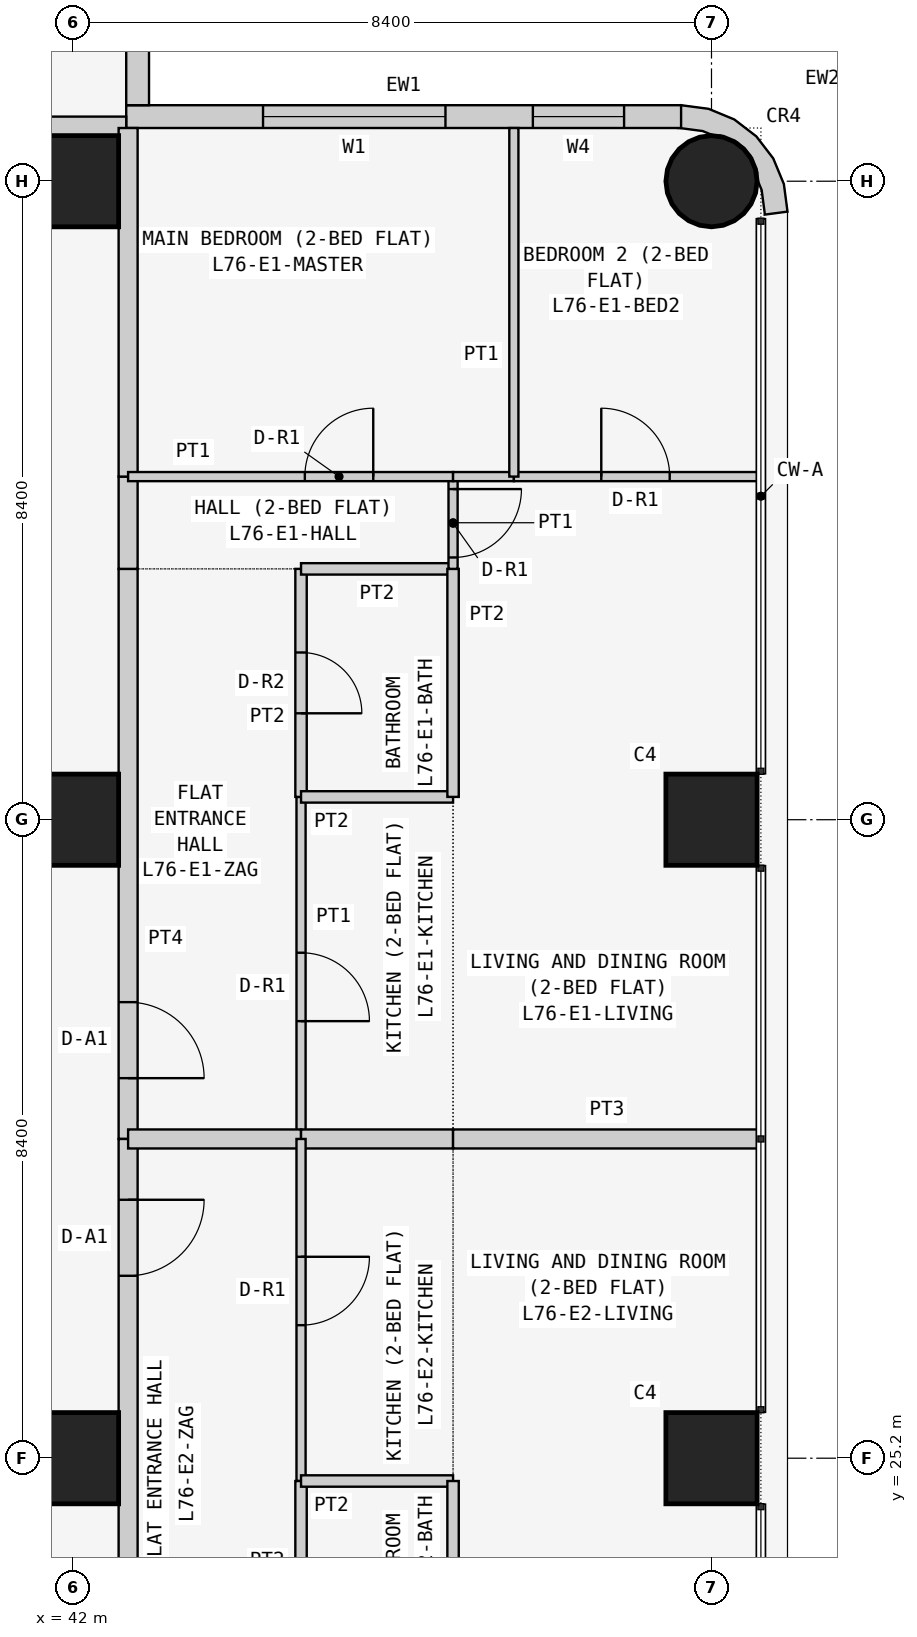
"""IFC4 building model, lengths in metres.
Left out: names, types, materials, properties, quantities, classifications, styles, units other than length and angle.
Written with IfcOpenShell. Run it as: python <this file> out.ifc"""

import sys

from ifc_helpers import new_model, si_unit, direction, frame, frame_2d, origin, origin_2d, place, context, subcontext, project, spatial, polyline, rectangle, circle, outline, extrude, element, fill, save


model = new_model("IFC4")
c1 = context("Model", 3, precision=1e-05, world=origin(), true_north=direction((0.0, 1.0)))
c2 = subcontext(c1, "Body", "Model", "MODEL_VIEW")
j1 = project(units=[si_unit("LENGTHUNIT", "METRE"), si_unit("PLANEANGLEUNIT", "RADIAN")], contexts=[c1])
p1 = place(None, origin())
s1 = spatial("IfcSite", under=j1, at=p1, CompositionType="ELEMENT")
p2 = place(p1, origin())
s2 = spatial("IfcBuilding", under=s1, at=p2, CompositionType="ELEMENT")
p3 = place(p2, frame((0.0, 0.0, 290.1)))
s3 = spatial("IfcBuildingStorey", under=s2, at=p3, CompositionType="ELEMENT", Elevation=290.1)
for number, where, z_axis, x_axis in (
    (1, (42.0, 25.2, 0.0), (0.0, 0.0, 1.0), (1.0, 0.0, 0.0)),
    (2, (42.0, 33.6, 0.0), (0.0, 0.0, 1.0), (1.0, 0.0, 0.0)),
    (3, (42.0, 42.0, 0.0), (0.0, 0.0, 1.0), (1.0, 0.0, 0.0)),
    (4, (50.4, 25.2, 0.0), (0.0, 0.0, 1.0), (1.0, 0.0, 0.0)),
    (5, (50.4, 33.6, 0.0), (0.0, 0.0, 1.0), (1.0, 0.0, 0.0)),
):
    element("IfcColumn", number, at=place(p3, frame(where, z_axis=z_axis, x_axis=x_axis)), inside=s3, PredefinedType="COLUMN", context=c2, shape_type="SweptSolid", body=[
        extrude(rectangle(XDim=1.2, YDim=1.2, at=origin_2d()), origin(), (0.0, 0.0, 1.0), 3.6),
    ])
p4 = place(p3, frame((50.4, 42.0, 0.0), z_axis=(0.0, 0.0, 1.0), x_axis=(1.0, 0.0, 0.0)))
e6 = element("IfcColumn", 6, at=p4, inside=s3, PredefinedType="COLUMN", context=c2, shape_type="SweptSolid", body=[
    extrude(circle(Radius=0.6, at=origin_2d()), origin(), (0.0, 0.0, 1.0), 3.6),
])
p5 = place(p3, frame((50.0, 42.85, 0.0), z_axis=(0.0, 0.0, 1.0), x_axis=(-1.0, 0.0, 0.0)))
e7 = element("IfcWall", 7, at=p5, inside=s3, PredefinedType="SOLIDWALL", context=c2, shape_type="SweptSolid", body=[
    extrude(rectangle(XDim=7.3, YDim=0.3, at=frame_2d((3.65, 0.0))), origin(), (0.0, 0.0, 1.0), 3.45),
])
p6 = place(p5, frame((3.1, 0.0, 0.9)))
e8 = element("IfcOpeningElement", 8, at=p6, cuts=e7, PredefinedType="OPENING", context=c2, shape_type="SweptSolid", body=[
    extrude(rectangle(XDim=2.4, YDim=1.5, at=frame_2d((1.2, 0.75))), frame((0.0, 0.16, 0.0), z_axis=(0.0, -1.0, 0.0), x_axis=(1.0, 0.0, 0.0)), (0.0, 0.0, 1.0), 0.32),
])
p7 = place(p5, frame((0.75, 0.0, 0.9)))
e9 = element("IfcOpeningElement", 9, at=p7, cuts=e7, PredefinedType="OPENING", context=c2, shape_type="SweptSolid", body=[
    extrude(rectangle(XDim=1.2, YDim=1.5, at=frame_2d((0.6, 0.75))), frame((0.0, 0.16, 0.0), z_axis=(0.0, -1.0, 0.0), x_axis=(1.0, 0.0, 0.0)), (0.0, 0.0, 1.0), 0.32),
])
p8 = place(p3, frame((42.85, 43.0, 0.0), z_axis=(0.0, 0.0, 1.0), x_axis=(0.0, 1.0, 0.0)))
e10 = element("IfcWall", 10, at=p8, inside=s3, PredefinedType="SOLIDWALL", context=c2, shape_type="SweptSolid", body=[
    extrude(rectangle(XDim=7.0, YDim=0.3, at=frame_2d((3.5, 0.0))), origin(), (0.0, 0.0, 1.0), 3.45),
])
p9 = place(p8, frame((1.5, 0.0, 0.9)))
e11 = element("IfcOpeningElement", 11, at=p9, cuts=e10, PredefinedType="OPENING", context=c2, shape_type="SweptSolid", body=[
    extrude(rectangle(XDim=2.4, YDim=1.5, at=frame_2d((1.2, 0.75))), frame((0.0, 0.16, 0.0), z_axis=(0.0, -1.0, 0.0), x_axis=(1.0, 0.0, 0.0)), (0.0, 0.0, 1.0), 0.32),
])
p10 = place(p8, frame((5.05, 0.0, 0.9)))
e12 = element("IfcOpeningElement", 12, at=p10, cuts=e10, PredefinedType="OPENING", context=c2, shape_type="SweptSolid", body=[
    extrude(rectangle(XDim=1.2, YDim=1.5, at=frame_2d((0.6, 0.75))), frame((0.0, 0.16, 0.0), z_axis=(0.0, -1.0, 0.0), x_axis=(1.0, 0.0, 0.0)), (0.0, 0.0, 1.0), 0.32),
])
p11 = place(p3, frame((50.976, 41.638, 0.0), z_axis=(0.0, 0.0, 1.0), x_axis=(0.707106781187, 0.707106781187, 0.0)))
e13 = element("IfcWall", 13, at=p11, inside=s3, PredefinedType="SOLIDWALL", context=c2, shape_type="SweptSolid", body=[
    extrude(outline(polyline([(0.233, 0.114), (0.047, -0.129), (0.033, -0.143), (0.273, -0.327), (0.495, -0.037), (0.635, 0.301), (0.683, 0.663), (0.635, 1.025), (0.495, 1.363), (0.273, 1.653), (0.033, 1.469), (0.047, 1.455), (0.233, 1.212), (0.292, 1.069), (0.358, 1.003), (0.449, 0.782), (0.449, 0.543), (0.358, 0.322), (0.292, 0.257), (0.233, 0.114)])), origin(), (0.0, 0.0, 1.0), 3.45),
])
p12 = place(p3, frame((35.829, 42.725, 0.0), z_axis=(0.0, 0.0, 1.0), x_axis=(1.0, 0.0, 0.0)))
e14 = element("IfcWall", 14, at=p12, inside=s3, PredefinedType="PARTITIONING", context=c2, shape_type="SweptSolid", body=[
    extrude(rectangle(XDim=6.871, YDim=0.25, at=frame_2d((3.436, 0.0))), origin(), (0.0, 0.0, 1.0), 3.45),
])
p13 = place(p3, frame((42.725, 36.9, 0.0), z_axis=(0.0, 0.0, 1.0), x_axis=(0.0, -1.0, 0.0)))
e15 = element("IfcWall", 15, at=p13, inside=s3, PredefinedType="PARTITIONING", context=c2, shape_type="SweptSolid", body=[
    extrude(rectangle(XDim=7.5, YDim=0.25, at=frame_2d((3.75, 0.0))), origin(), (0.0, 0.0, 1.0), 3.45),
])
p14 = place(p13, frame((5.7, 0.0, 0.0)))
e16 = element("IfcOpeningElement", 16, at=p14, cuts=e15, PredefinedType="OPENING", context=c2, shape_type="SweptSolid", body=[
    extrude(rectangle(XDim=1.0, YDim=2.1, at=frame_2d((0.5, 1.05))), frame((0.0, 0.135, 0.0), z_axis=(0.0, -1.0, 0.0), x_axis=(1.0, 0.0, 0.0)), (0.0, 0.0, 1.0), 0.27),
])
p15 = place(p3, frame((42.725, 38.114, 0.0), z_axis=(0.0, 0.0, 1.0), x_axis=(0.0, -1.0, 0.0)))
e17 = element("IfcWall", 17, at=p15, inside=s3, PredefinedType="PARTITIONING", context=c2, shape_type="SweptSolid", body=[
    extrude(rectangle(XDim=1.214, YDim=0.25, at=frame_2d((0.607, 0.0))), origin(), (0.0, 0.0, 1.0), 3.45),
])
p16 = place(p3, frame((42.725, 42.7, 0.0), z_axis=(0.0, 0.0, 1.0), x_axis=(0.0, -1.0, 0.0)))
e18 = element("IfcWall", 18, at=p16, inside=s3, PredefinedType="PARTITIONING", context=c2, shape_type="SweptSolid", body=[
    extrude(rectangle(XDim=4.586, YDim=0.25, at=frame_2d((2.293, 0.0))), origin(), (0.0, 0.0, 1.0), 3.45),
])
p17 = place(p3, frame((42.725, 29.4, 0.0), z_axis=(0.0, 0.0, 1.0), x_axis=(0.0, -1.0, 0.0)))
e19 = element("IfcWall", 19, at=p17, inside=s3, PredefinedType="PARTITIONING", context=c2, shape_type="SweptSolid", body=[
    extrude(rectangle(XDim=7.5, YDim=0.25, at=frame_2d((3.75, 0.0))), origin(), (0.0, 0.0, 1.0), 3.45),
])
p18 = place(p17, frame((0.8, 0.0, 0.0)))
e20 = element("IfcOpeningElement", 20, at=p18, cuts=e19, PredefinedType="OPENING", context=c2, shape_type="SweptSolid", body=[
    extrude(rectangle(XDim=1.0, YDim=2.1, at=frame_2d((0.5, 1.05))), frame((0.0, 0.135, 0.0), z_axis=(0.0, -1.0, 0.0), x_axis=(1.0, 0.0, 0.0)), (0.0, 0.0, 1.0), 0.27),
])
p19 = place(p3, frame((45.0, 29.4, 0.0), z_axis=(0.0, 0.0, 1.0), x_axis=(0.0, 1.0, 0.0)))
e21 = element("IfcWall", 21, at=p19, inside=s3, PredefinedType="PARTITIONING", context=c2, shape_type="SweptSolid", body=[
    extrude(rectangle(XDim=4.5, YDim=0.12, at=frame_2d((2.25, 0.0))), origin(), (0.0, 0.0, 1.0), 3.45),
])
p20 = place(p19, frame((1.55, 0.0, 0.0)))
e22 = element("IfcOpeningElement", 22, at=p20, cuts=e21, PredefinedType="OPENING", context=c2, shape_type="SweptSolid", body=[
    extrude(rectangle(XDim=0.9, YDim=2.1, at=frame_2d((0.45, 1.05))), frame((0.0, 0.07, 0.0), z_axis=(0.0, -1.0, 0.0), x_axis=(1.0, 0.0, 0.0)), (0.0, 0.0, 1.0), 0.14),
])
p21 = place(p3, frame((45.0, 33.9, 0.0), z_axis=(0.0, 0.0, 1.0), x_axis=(0.0, 1.0, 0.0)))
e23 = element("IfcWall", 23, at=p21, inside=s3, PredefinedType="PARTITIONING", context=c2, shape_type="SweptSolid", body=[
    extrude(rectangle(XDim=3.0, YDim=0.15, at=frame_2d((1.5, 0.0))), origin(), (0.0, 0.0, 1.0), 3.45),
])
p22 = place(p21, frame((1.1, 0.0, 0.0)))
e24 = element("IfcOpeningElement", 24, at=p22, cuts=e23, PredefinedType="OPENING", context=c2, shape_type="SweptSolid", body=[
    extrude(rectangle(XDim=0.8, YDim=2.1, at=frame_2d((0.4, 1.05))), frame((0.0, 0.085, 0.0), z_axis=(0.0, -1.0, 0.0), x_axis=(1.0, 0.0, 0.0)), (0.0, 0.0, 1.0), 0.17),
])
p23 = place(p3, frame((42.725, 29.4, 0.0), z_axis=(0.0, 0.0, 1.0), x_axis=(1.0, 0.0, 0.0)))
e25 = element("IfcWall", 25, at=p23, inside=s3, PredefinedType="PARTITIONING", context=c2, shape_type="SweptSolid", body=[
    extrude(rectangle(XDim=2.275, YDim=0.25, at=frame_2d((1.137, 0.0))), origin(), (0.0, 0.0, 1.0), 3.45),
])
p24 = place(p3, frame((47.0, 33.9, 0.0), z_axis=(0.0, 0.0, 1.0), x_axis=(-1.0, 0.0, 0.0)))
e26 = element("IfcWall", 26, at=p24, inside=s3, PredefinedType="PARTITIONING", context=c2, shape_type="SweptSolid", body=[
    extrude(rectangle(XDim=2.0, YDim=0.15, at=frame_2d((1.0, 0.0))), origin(), (0.0, 0.0, 1.0), 3.45),
])
p25 = place(p3, frame((45.0, 29.4, 0.0), z_axis=(0.0, 0.0, 1.0), x_axis=(1.0, 0.0, 0.0)))
e27 = element("IfcWall", 27, at=p25, inside=s3, PredefinedType="PARTITIONING", context=c2, shape_type="SweptSolid", body=[
    extrude(rectangle(XDim=2.0, YDim=0.25, at=frame_2d((1.0, 0.0))), origin(), (0.0, 0.0, 1.0), 3.45),
])
p26 = place(p3, frame((47.0, 36.9, 0.0), z_axis=(0.0, 0.0, 1.0), x_axis=(-1.0, 0.0, 0.0)))
e28 = element("IfcWall", 28, at=p26, inside=s3, PredefinedType="PARTITIONING", context=c2, shape_type="SweptSolid", body=[
    extrude(rectangle(XDim=2.0, YDim=0.15, at=frame_2d((1.0, 0.0))), origin(), (0.0, 0.0, 1.0), 3.45),
])
p27 = place(p3, frame((47.0, 33.9, 0.0), z_axis=(0.0, 0.0, 1.0), x_axis=(0.0, 1.0, 0.0)))
e29 = element("IfcWall", 29, at=p27, inside=s3, PredefinedType="PARTITIONING", context=c2, shape_type="SweptSolid", body=[
    extrude(rectangle(XDim=3.0, YDim=0.15, at=frame_2d((1.5, 0.0))), origin(), (0.0, 0.0, 1.0), 3.45),
])
p28 = place(p3, frame((47.0, 36.9, 0.0), z_axis=(0.0, 0.0, 1.0), x_axis=(0.0, 1.0, 0.0)))
e30 = element("IfcWall", 30, at=p28, inside=s3, PredefinedType="PARTITIONING", context=c2, shape_type="SweptSolid", body=[
    extrude(rectangle(XDim=1.214, YDim=0.12, at=frame_2d((0.607, 0.0))), origin(), (0.0, 0.0, 1.0), 3.45),
])
p29 = place(p28, frame((0.15, 0.0, 0.0)))
e31 = element("IfcOpeningElement", 31, at=p29, cuts=e30, PredefinedType="OPENING", context=c2, shape_type="SweptSolid", body=[
    extrude(rectangle(XDim=0.9, YDim=2.1, at=frame_2d((0.45, 1.05))), frame((0.0, 0.07, 0.0), z_axis=(0.0, -1.0, 0.0), x_axis=(1.0, 0.0, 0.0)), (0.0, 0.0, 1.0), 0.14),
])
p30 = place(p3, frame((47.0, 38.114, 0.0), z_axis=(0.0, 0.0, 1.0), x_axis=(-1.0, 0.0, 0.0)))
e32 = element("IfcWall", 32, at=p30, inside=s3, PredefinedType="PARTITIONING", context=c2, shape_type="SweptSolid", body=[
    extrude(rectangle(XDim=4.275, YDim=0.12, at=frame_2d((2.137, 0.0))), origin(), (0.0, 0.0, 1.0), 3.45),
])
p31 = place(p30, frame((1.05, 0.0, 0.0)))
e33 = element("IfcOpeningElement", 33, at=p31, cuts=e32, PredefinedType="OPENING", context=c2, shape_type="SweptSolid", body=[
    extrude(rectangle(XDim=0.9, YDim=2.1, at=frame_2d((0.45, 1.05))), frame((0.0, 0.07, 0.0), z_axis=(0.0, -1.0, 0.0), x_axis=(1.0, 0.0, 0.0)), (0.0, 0.0, 1.0), 0.14),
])
p32 = place(p3, frame((47.8, 38.114, 0.0), z_axis=(0.0, 0.0, 1.0), x_axis=(-1.0, 0.0, 0.0)))
e34 = element("IfcWall", 34, at=p32, inside=s3, PredefinedType="PARTITIONING", context=c2, shape_type="SweptSolid", body=[
    extrude(rectangle(XDim=0.8, YDim=0.12, at=frame_2d((0.4, 0.0))), origin(), (0.0, 0.0, 1.0), 3.45),
])
p33 = place(p3, frame((51.05, 38.114, 0.0), z_axis=(0.0, 0.0, 1.0), x_axis=(-1.0, 0.0, 0.0)))
e35 = element("IfcWall", 35, at=p33, inside=s3, PredefinedType="PARTITIONING", context=c2, shape_type="SweptSolid", body=[
    extrude(rectangle(XDim=3.25, YDim=0.12, at=frame_2d((1.625, 0.0))), origin(), (0.0, 0.0, 1.0), 3.45),
])
p34 = place(p33, frame((1.2, 0.0, 0.0)))
e36 = element("IfcOpeningElement", 36, at=p34, cuts=e35, PredefinedType="OPENING", context=c2, shape_type="SweptSolid", body=[
    extrude(rectangle(XDim=0.9, YDim=2.1, at=frame_2d((0.45, 1.05))), frame((0.0, 0.07, 0.0), z_axis=(0.0, -1.0, 0.0), x_axis=(1.0, 0.0, 0.0)), (0.0, 0.0, 1.0), 0.14),
])
p35 = place(p3, frame((47.0, 29.4, 0.0), z_axis=(0.0, 0.0, 1.0), x_axis=(1.0, 0.0, 0.0)))
e37 = element("IfcWall", 37, at=p35, inside=s3, PredefinedType="PARTITIONING", context=c2, shape_type="SweptSolid", body=[
    extrude(rectangle(XDim=4.05, YDim=0.25, at=frame_2d((2.025, 0.0))), origin(), (0.0, 0.0, 1.0), 3.45),
])
p36 = place(p3, frame((47.8, 38.114, 0.0), z_axis=(0.0, 0.0, 1.0), x_axis=(0.0, 1.0, 0.0)))
e38 = element("IfcWall", 38, at=p36, inside=s3, PredefinedType="PARTITIONING", context=c2, shape_type="SweptSolid", body=[
    extrude(rectangle(XDim=4.586, YDim=0.12, at=frame_2d((2.293, 0.0))), origin(), (0.0, 0.0, 1.0), 3.45),
])
p37 = place(p3, frame((45.0, 29.4, 0.0), z_axis=(0.0, 0.0, 1.0), x_axis=(0.0, -1.0, 0.0)))
e39 = element("IfcWall", 39, at=p37, inside=s3, PredefinedType="PARTITIONING", context=c2, shape_type="SweptSolid", body=[
    extrude(rectangle(XDim=4.5, YDim=0.12, at=frame_2d((2.25, 0.0))), origin(), (0.0, 0.0, 1.0), 3.45),
])
p38 = place(p37, frame((1.55, 0.0, 0.0)))
e40 = element("IfcOpeningElement", 40, at=p38, cuts=e39, PredefinedType="OPENING", context=c2, shape_type="SweptSolid", body=[
    extrude(rectangle(XDim=0.9, YDim=2.1, at=frame_2d((0.45, 1.05))), frame((0.0, 0.07, 0.0), z_axis=(0.0, -1.0, 0.0), x_axis=(1.0, 0.0, 0.0)), (0.0, 0.0, 1.0), 0.14),
])
p39 = place(p3, frame((45.0, 24.9, 0.0), z_axis=(0.0, 0.0, 1.0), x_axis=(0.0, -1.0, 0.0)))
e41 = element("IfcWall", 41, at=p39, inside=s3, PredefinedType="PARTITIONING", context=c2, shape_type="SweptSolid", body=[
    extrude(rectangle(XDim=3.0, YDim=0.15, at=frame_2d((1.5, 0.0))), origin(), (0.0, 0.0, 1.0), 3.45),
])
p40 = place(p39, frame((1.1, 0.0, 0.0)))
e42 = element("IfcOpeningElement", 42, at=p40, cuts=e41, PredefinedType="OPENING", context=c2, shape_type="SweptSolid", body=[
    extrude(rectangle(XDim=0.8, YDim=2.1, at=frame_2d((0.4, 1.05))), frame((0.0, 0.085, 0.0), z_axis=(0.0, -1.0, 0.0), x_axis=(1.0, 0.0, 0.0)), (0.0, 0.0, 1.0), 0.17),
])
p41 = place(p3, frame((47.0, 24.9, 0.0), z_axis=(0.0, 0.0, 1.0), x_axis=(-1.0, 0.0, 0.0)))
e43 = element("IfcWall", 43, at=p41, inside=s3, PredefinedType="PARTITIONING", context=c2, shape_type="SweptSolid", body=[
    extrude(rectangle(XDim=2.0, YDim=0.15, at=frame_2d((1.0, 0.0))), origin(), (0.0, 0.0, 1.0), 3.45),
])
p42 = place(p3, frame((47.0, 24.9, 0.0), z_axis=(0.0, 0.0, 1.0), x_axis=(0.0, -1.0, 0.0)))
e44 = element("IfcWall", 44, at=p42, inside=s3, PredefinedType="PARTITIONING", context=c2, shape_type="SweptSolid", body=[
    extrude(rectangle(XDim=3.0, YDim=0.15, at=frame_2d((1.5, 0.0))), origin(), (0.0, 0.0, 1.0), 3.45),
])
p43 = place(p6, origin())
e45 = element("IfcWindow", 45, at=p43, inside=s3, PartitioningType="SINGLE_PANEL", PredefinedType="WINDOW", context=c2, shape_type="SweptSolid", body=[
    extrude(rectangle(XDim=2.4, YDim=1.5, at=frame_2d((1.2, 0.75))), frame((0.0, 0.03, 0.0), z_axis=(0.0, -1.0, 0.0), x_axis=(1.0, 0.0, 0.0)), (0.0, 0.0, 1.0), 0.06),
])
fill(e8, e45)
p44 = place(p7, origin())
e46 = element("IfcWindow", 46, at=p44, inside=s3, PartitioningType="SINGLE_PANEL", PredefinedType="WINDOW", context=c2, shape_type="SweptSolid", body=[
    extrude(rectangle(XDim=1.2, YDim=1.5, at=frame_2d((0.6, 0.75))), frame((0.0, 0.03, 0.0), z_axis=(0.0, -1.0, 0.0), x_axis=(1.0, 0.0, 0.0)), (0.0, 0.0, 1.0), 0.06),
])
fill(e9, e46)
p45 = place(p14, origin())
e47 = element("IfcDoor", 47, at=p45, inside=s3, OperationType="SINGLE_SWING_RIGHT", PredefinedType="DOOR", context=c2, shape_type="SweptSolid", body=[
    extrude(rectangle(XDim=1.0, YDim=2.1, at=frame_2d((0.5, 1.05))), frame((0.0, 0.025, 0.0), z_axis=(0.0, -1.0, 0.0), x_axis=(1.0, 0.0, 0.0)), (0.0, 0.0, 1.0), 0.05),
])
fill(e16, e47)
p46 = place(p20, frame((0.9, 0.0, 0.0), z_axis=(0.0, 0.0, 1.0), x_axis=(-1.0, 0.0, 0.0)))
e48 = element("IfcDoor", 48, at=p46, inside=s3, OperationType="SINGLE_SWING_RIGHT", PredefinedType="DOOR", context=c2, shape_type="SweptSolid", body=[
    extrude(rectangle(XDim=0.9, YDim=2.1, at=frame_2d((0.45, 1.05))), frame((0.0, 0.025, 0.0), z_axis=(0.0, -1.0, 0.0), x_axis=(1.0, 0.0, 0.0)), (0.0, 0.0, 1.0), 0.05),
])
fill(e22, e48)
p47 = place(p22, frame((0.8, 0.0, 0.0), z_axis=(0.0, 0.0, 1.0), x_axis=(-1.0, 0.0, 0.0)))
e49 = element("IfcDoor", 49, at=p47, inside=s3, OperationType="SINGLE_SWING_RIGHT", PredefinedType="DOOR", context=c2, shape_type="SweptSolid", body=[
    extrude(rectangle(XDim=0.8, YDim=2.1, at=frame_2d((0.4, 1.05))), frame((0.0, 0.025, 0.0), z_axis=(0.0, -1.0, 0.0), x_axis=(1.0, 0.0, 0.0)), (0.0, 0.0, 1.0), 0.05),
])
fill(e24, e49)
p48 = place(p29, frame((0.9, 0.0, 0.0), z_axis=(0.0, 0.0, 1.0), x_axis=(-1.0, 0.0, 0.0)))
e50 = element("IfcDoor", 50, at=p48, inside=s3, OperationType="SINGLE_SWING_LEFT", PredefinedType="DOOR", context=c2, shape_type="SweptSolid", body=[
    extrude(rectangle(XDim=0.9, YDim=2.1, at=frame_2d((0.45, 1.05))), frame((0.0, 0.025, 0.0), z_axis=(0.0, -1.0, 0.0), x_axis=(1.0, 0.0, 0.0)), (0.0, 0.0, 1.0), 0.05),
])
fill(e31, e50)
p49 = place(p31, frame((0.9, 0.0, 0.0), z_axis=(0.0, 0.0, 1.0), x_axis=(-1.0, 0.0, 0.0)))
e51 = element("IfcDoor", 51, at=p49, inside=s3, OperationType="SINGLE_SWING_RIGHT", PredefinedType="DOOR", context=c2, shape_type="SweptSolid", body=[
    extrude(rectangle(XDim=0.9, YDim=2.1, at=frame_2d((0.45, 1.05))), frame((0.0, 0.025, 0.0), z_axis=(0.0, -1.0, 0.0), x_axis=(1.0, 0.0, 0.0)), (0.0, 0.0, 1.0), 0.05),
])
fill(e33, e51)
p50 = place(p34, frame((0.9, 0.0, 0.0), z_axis=(0.0, 0.0, 1.0), x_axis=(-1.0, 0.0, 0.0)))
e52 = element("IfcDoor", 52, at=p50, inside=s3, OperationType="SINGLE_SWING_LEFT", PredefinedType="DOOR", context=c2, shape_type="SweptSolid", body=[
    extrude(rectangle(XDim=0.9, YDim=2.1, at=frame_2d((0.45, 1.05))), frame((0.0, 0.025, 0.0), z_axis=(0.0, -1.0, 0.0), x_axis=(1.0, 0.0, 0.0)), (0.0, 0.0, 1.0), 0.05),
])
fill(e36, e52)
p51 = place(p18, origin())
e53 = element("IfcDoor", 53, at=p51, inside=s3, OperationType="SINGLE_SWING_LEFT", PredefinedType="DOOR", context=c2, shape_type="SweptSolid", body=[
    extrude(rectangle(XDim=1.0, YDim=2.1, at=frame_2d((0.5, 1.05))), frame((0.0, 0.025, 0.0), z_axis=(0.0, -1.0, 0.0), x_axis=(1.0, 0.0, 0.0)), (0.0, 0.0, 1.0), 0.05),
])
fill(e20, e53)
p52 = place(p38, origin())
e54 = element("IfcDoor", 54, at=p52, inside=s3, OperationType="SINGLE_SWING_LEFT", PredefinedType="DOOR", context=c2, shape_type="SweptSolid", body=[
    extrude(rectangle(XDim=0.9, YDim=2.1, at=frame_2d((0.45, 1.05))), frame((0.0, 0.025, 0.0), z_axis=(0.0, -1.0, 0.0), x_axis=(1.0, 0.0, 0.0)), (0.0, 0.0, 1.0), 0.05),
])
fill(e40, e54)
save(model, sys.argv[1])
